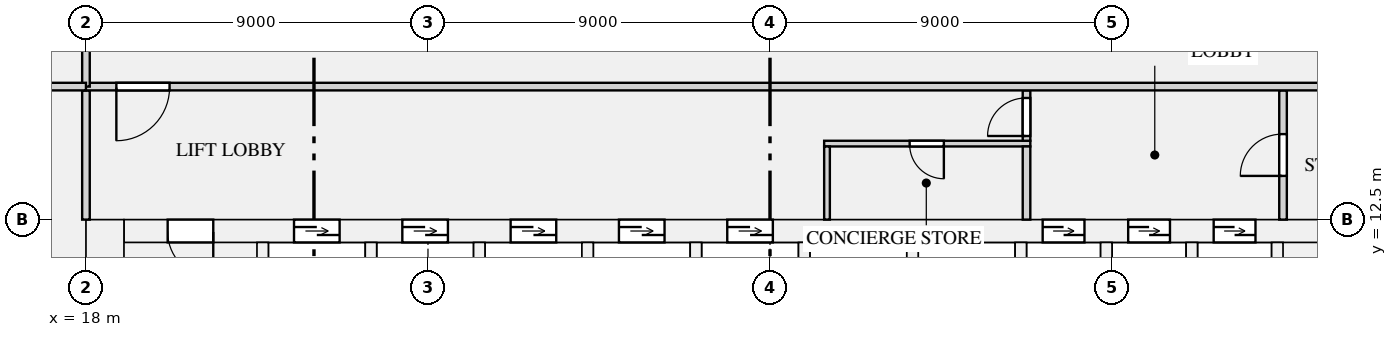
"""IFC4 building model, lengths in metres.
Left out: names, types, materials, properties, quantities, classifications, styles, units other than length and angle.
Written with IfcOpenShell. Run it as: python <this file> out.ifc"""

import sys

from ifc_helpers import new_model, si_unit, direction, frame, frame_2d, origin, place, context, subcontext, project, spatial, rectangle, extrude, element, fill, save


model = new_model("IFC4")
c1 = context("Model", 3, precision=1e-05, world=origin(), true_north=direction((0.0, 1.0)))
c2 = subcontext(c1, "Body", "Model", "MODEL_VIEW")
j1 = project(units=[si_unit("LENGTHUNIT", "METRE"), si_unit("PLANEANGLEUNIT", "RADIAN")], contexts=[c1])
p1 = place(None, origin())
s1 = spatial("IfcSite", under=j1, at=p1, CompositionType="ELEMENT")
p2 = place(p1, origin())
s2 = spatial("IfcBuilding", under=s1, at=p2, CompositionType="ELEMENT")
p3 = place(p2, frame((0.0, 0.0, 11.0)))
s3 = spatial("IfcBuildingStorey", under=s2, at=p3, CompositionType="ELEMENT", Elevation=11.0)
p4 = place(p3, frame((18.5, 0.0, 0.0), z_axis=(0.0, 0.0, 1.0), x_axis=(0.0, 1.0, 0.0)))
e1 = element("IfcWall", 1, at=p4, inside=s3, PredefinedType="SHEAR", context=c2, shape_type="SweptSolid", body=[
    extrude(rectangle(XDim=12.5, YDim=1.0, at=frame_2d((6.25, 0.0))), origin(), (0.0, 0.0, 1.0), 4.5),
])
p5 = place(p3, frame((19.0, 12.2, 0.0), z_axis=(0.0, 0.0, 1.0), x_axis=(1.0, 0.0, 0.0)))
e2 = element("IfcWall", 2, at=p5, inside=s3, PredefinedType="SHEAR", context=c2, shape_type="SweptSolid", body=[
    extrude(rectangle(XDim=34.0, YDim=0.6, at=frame_2d((17.0, 0.0))), origin(), (0.0, 0.0, 1.0), 4.5),
])
p6 = place(p5, frame((4.475, 0.0, 0.0)))
e3 = element("IfcOpeningElement", 3, at=p6, cuts=e2, PredefinedType="OPENING", context=c2, shape_type="SweptSolid", body=[
    extrude(rectangle(XDim=1.2, YDim=2.1, at=frame_2d((0.6, 1.05))), frame((0.0, 0.31, 0.0), z_axis=(0.0, -1.0, 0.0), x_axis=(1.0, 0.0, 0.0)), (0.0, 0.0, 1.0), 0.62),
])
p7 = place(p5, frame((7.325, 0.0, 0.0)))
e4 = element("IfcOpeningElement", 4, at=p7, cuts=e2, PredefinedType="OPENING", context=c2, shape_type="SweptSolid", body=[
    extrude(rectangle(XDim=1.2, YDim=2.1, at=frame_2d((0.6, 1.05))), frame((0.0, 0.31, 0.0), z_axis=(0.0, -1.0, 0.0), x_axis=(1.0, 0.0, 0.0)), (0.0, 0.0, 1.0), 0.62),
])
p8 = place(p5, frame((10.175, 0.0, 0.0)))
e5 = element("IfcOpeningElement", 5, at=p8, cuts=e2, PredefinedType="OPENING", context=c2, shape_type="SweptSolid", body=[
    extrude(rectangle(XDim=1.2, YDim=2.1, at=frame_2d((0.6, 1.05))), frame((0.0, 0.31, 0.0), z_axis=(0.0, -1.0, 0.0), x_axis=(1.0, 0.0, 0.0)), (0.0, 0.0, 1.0), 0.62),
])
p9 = place(p5, frame((13.025, 0.0, 0.0)))
e6 = element("IfcOpeningElement", 6, at=p9, cuts=e2, PredefinedType="OPENING", context=c2, shape_type="SweptSolid", body=[
    extrude(rectangle(XDim=1.2, YDim=2.1, at=frame_2d((0.6, 1.05))), frame((0.0, 0.31, 0.0), z_axis=(0.0, -1.0, 0.0), x_axis=(1.0, 0.0, 0.0)), (0.0, 0.0, 1.0), 0.62),
])
p10 = place(p5, frame((15.875, 0.0, 0.0)))
e7 = element("IfcOpeningElement", 7, at=p10, cuts=e2, PredefinedType="OPENING", context=c2, shape_type="SweptSolid", body=[
    extrude(rectangle(XDim=1.2, YDim=2.1, at=frame_2d((0.6, 1.05))), frame((0.0, 0.31, 0.0), z_axis=(0.0, -1.0, 0.0), x_axis=(1.0, 0.0, 0.0)), (0.0, 0.0, 1.0), 0.62),
])
p11 = place(p5, frame((24.175, 0.0, 0.0)))
e8 = element("IfcOpeningElement", 8, at=p11, cuts=e2, PredefinedType="OPENING", context=c2, shape_type="SweptSolid", body=[
    extrude(rectangle(XDim=1.1, YDim=2.1, at=frame_2d((0.55, 1.05))), frame((0.0, 0.31, 0.0), z_axis=(0.0, -1.0, 0.0), x_axis=(1.0, 0.0, 0.0)), (0.0, 0.0, 1.0), 0.62),
])
p12 = place(p5, frame((26.425, 0.0, 0.0)))
e9 = element("IfcOpeningElement", 9, at=p12, cuts=e2, PredefinedType="OPENING", context=c2, shape_type="SweptSolid", body=[
    extrude(rectangle(XDim=1.1, YDim=2.1, at=frame_2d((0.55, 1.05))), frame((0.0, 0.31, 0.0), z_axis=(0.0, -1.0, 0.0), x_axis=(1.0, 0.0, 0.0)), (0.0, 0.0, 1.0), 0.62),
])
p13 = place(p5, frame((28.675, 0.0, 0.0)))
e10 = element("IfcOpeningElement", 10, at=p13, cuts=e2, PredefinedType="OPENING", context=c2, shape_type="SweptSolid", body=[
    extrude(rectangle(XDim=1.1, YDim=2.1, at=frame_2d((0.55, 1.05))), frame((0.0, 0.31, 0.0), z_axis=(0.0, -1.0, 0.0), x_axis=(1.0, 0.0, 0.0)), (0.0, 0.0, 1.0), 0.62),
])
p14 = place(p5, frame((1.15, 0.0, 0.0)))
e11 = element("IfcOpeningElement", 11, at=p14, cuts=e2, PredefinedType="OPENING", context=c2, shape_type="SweptSolid", body=[
    extrude(rectangle(XDim=1.2, YDim=2.1, at=frame_2d((0.6, 1.05))), frame((0.0, 0.31, 0.0), z_axis=(0.0, -1.0, 0.0), x_axis=(1.0, 0.0, 0.0)), (0.0, 0.0, 1.0), 0.62),
])
p15 = place(p5, frame((31.65, 0.0, 0.0)))
e12 = element("IfcOpeningElement", 12, at=p15, cuts=e2, PredefinedType="OPENING", context=c2, shape_type="SweptSolid", body=[
    extrude(rectangle(XDim=1.2, YDim=2.1, at=frame_2d((0.6, 1.05))), frame((0.0, 0.31, 0.0), z_axis=(0.0, -1.0, 0.0), x_axis=(1.0, 0.0, 0.0)), (0.0, 0.0, 1.0), 0.62),
])
for number, where, z_axis, x_axis in (
    (13, (22.65, 9.35, 0.0), (0.0, 0.0, 1.0), (0.0, 1.0, 0.0)),
    (14, (25.5, 9.35, 0.0), (0.0, 0.0, 1.0), (0.0, 1.0, 0.0)),
    (15, (28.35, 9.35, 0.0), (0.0, 0.0, 1.0), (0.0, 1.0, 0.0)),
    (16, (31.2, 9.35, 0.0), (0.0, 0.0, 1.0), (0.0, 1.0, 0.0)),
    (17, (34.05, 9.35, 0.0), (0.0, 0.0, 1.0), (0.0, 1.0, 0.0)),
    (18, (36.9, 9.35, 0.0), (0.0, 0.0, 1.0), (0.0, 1.0, 0.0)),
    (19, (39.75, 9.35, 0.0), (0.0, 0.0, 1.0), (0.0, 1.0, 0.0)),
):
    element("IfcWall", number, at=place(p3, frame(where, z_axis=z_axis, x_axis=x_axis)), inside=s3, PredefinedType="SHEAR", context=c2, shape_type="SweptSolid", body=[
        extrude(rectangle(XDim=2.55, YDim=0.3, at=frame_2d((1.275, 0.0))), origin(), (0.0, 0.0, 1.0), 4.5),
    ])
for number, where, z_axis, x_axis in (
    (20, (42.6, 8.25, 0.0), (0.0, 0.0, 1.0), (0.0, 1.0, 0.0)),
    (21, (44.85, 8.25, 0.0), (0.0, 0.0, 1.0), (0.0, 1.0, 0.0)),
    (22, (47.1, 8.25, 0.0), (0.0, 0.0, 1.0), (0.0, 1.0, 0.0)),
    (23, (49.35, 8.25, 0.0), (0.0, 0.0, 1.0), (0.0, 1.0, 0.0)),
):
    element("IfcWall", number, at=place(p3, frame(where, z_axis=z_axis, x_axis=x_axis)), inside=s3, PredefinedType="SHEAR", context=c2, shape_type="SweptSolid", body=[
        extrude(rectangle(XDim=3.65, YDim=0.3, at=frame_2d((1.825, 0.0))), origin(), (0.0, 0.0, 1.0), 4.5),
    ])
p16 = place(p3, frame((37.425, 14.5, 0.0), z_axis=(0.0, 0.0, 1.0), x_axis=(1.0, 0.0, 0.0)))
e24 = element("IfcWall", 24, at=p16, inside=s3, PredefinedType="PARTITIONING", context=c2, shape_type="SweptSolid", body=[
    extrude(rectangle(XDim=5.425, YDim=0.15, at=frame_2d((2.712, 0.0))), origin(), (0.0, 0.0, 1.0), 3.9),
])
p17 = place(p16, frame((2.25, 0.0, 0.0)))
e25 = element("IfcOpeningElement", 25, at=p17, cuts=e24, PredefinedType="OPENING", context=c2, shape_type="SweptSolid", body=[
    extrude(rectangle(XDim=0.9, YDim=2.1, at=frame_2d((0.45, 1.05))), frame((0.0, 0.085, 0.0), z_axis=(0.0, -1.0, 0.0), x_axis=(1.0, 0.0, 0.0)), (0.0, 0.0, 1.0), 0.17),
])
p18 = place(p3, frame((18.0, 12.5, 0.0), z_axis=(0.0, 0.0, 1.0), x_axis=(0.0, 1.0, 0.0)))
e26 = element("IfcWall", 26, at=p18, inside=s3, PredefinedType="PARTITIONING", context=c2, shape_type="SweptSolid", body=[
    extrude(rectangle(XDim=3.4, YDim=0.2, at=frame_2d((1.7, 0.0))), origin(), (0.0, 0.0, 1.0), 3.9),
])
p19 = place(p3, frame((37.5, 12.5, 0.0), z_axis=(0.0, 0.0, 1.0), x_axis=(0.0, 1.0, 0.0)))
e27 = element("IfcWall", 27, at=p19, inside=s3, PredefinedType="PARTITIONING", context=c2, shape_type="SweptSolid", body=[
    extrude(rectangle(XDim=1.925, YDim=0.15, at=frame_2d((0.962, 0.0))), origin(), (0.0, 0.0, 1.0), 3.9),
])
p20 = place(p3, frame((42.75, 12.5, 0.0), z_axis=(0.0, 0.0, 1.0), x_axis=(0.0, 1.0, 0.0)))
e28 = element("IfcWall", 28, at=p20, inside=s3, PredefinedType="PARTITIONING", context=c2, shape_type="SweptSolid", body=[
    extrude(rectangle(XDim=1.925, YDim=0.2, at=frame_2d((0.962, 0.0))), origin(), (0.0, 0.0, 1.0), 3.9),
])
p21 = place(p3, frame((49.5, 12.5, 0.0), z_axis=(0.0, 0.0, 1.0), x_axis=(0.0, 1.0, 0.0)))
e29 = element("IfcWall", 29, at=p21, inside=s3, PredefinedType="PARTITIONING", context=c2, shape_type="SweptSolid", body=[
    extrude(rectangle(XDim=3.4, YDim=0.2, at=frame_2d((1.7, 0.0))), origin(), (0.0, 0.0, 1.0), 3.9),
])
p22 = place(p21, frame((1.15, 0.0, 0.0)))
e30 = element("IfcOpeningElement", 30, at=p22, cuts=e29, PredefinedType="OPENING", context=c2, shape_type="SweptSolid", body=[
    extrude(rectangle(XDim=1.1, YDim=2.1, at=frame_2d((0.55, 1.05))), frame((0.0, 0.11, 0.0), z_axis=(0.0, -1.0, 0.0), x_axis=(1.0, 0.0, 0.0)), (0.0, 0.0, 1.0), 0.22),
])
p23 = place(p3, frame((42.75, 14.575, 0.0), z_axis=(0.0, 0.0, 1.0), x_axis=(0.0, 1.0, 0.0)))
e31 = element("IfcWall", 31, at=p23, inside=s3, PredefinedType="PARTITIONING", context=c2, shape_type="SweptSolid", body=[
    extrude(rectangle(XDim=1.325, YDim=0.2, at=frame_2d((0.663, 0.0))), origin(), (0.0, 0.0, 1.0), 3.9),
])
p24 = place(p23, frame((0.125, 0.0, 0.0)))
e32 = element("IfcOpeningElement", 32, at=p24, cuts=e31, PredefinedType="OPENING", context=c2, shape_type="SweptSolid", body=[
    extrude(rectangle(XDim=1.0, YDim=2.1, at=frame_2d((0.5, 1.05))), frame((0.0, 0.11, 0.0), z_axis=(0.0, -1.0, 0.0), x_axis=(1.0, 0.0, 0.0)), (0.0, 0.0, 1.0), 0.22),
])
p25 = place(p3, frame((17.9, 16.0, 0.0), z_axis=(0.0, 0.0, 1.0), x_axis=(1.0, 0.0, 0.0)))
e33 = element("IfcWall", 33, at=p25, inside=s3, PredefinedType="PARTITIONING", context=c2, shape_type="SweptSolid", body=[
    extrude(rectangle(XDim=36.2, YDim=0.2, at=frame_2d((18.1, 0.0))), origin(), (0.0, 0.0, 1.0), 3.9),
])
p26 = place(p25, frame((0.9, 0.0, 0.0)))
e34 = element("IfcOpeningElement", 34, at=p26, cuts=e33, PredefinedType="OPENING", context=c2, shape_type="SweptSolid", body=[
    extrude(rectangle(XDim=1.4, YDim=2.1, at=frame_2d((0.7, 1.05))), frame((0.0, 0.11, 0.0), z_axis=(0.0, -1.0, 0.0), x_axis=(1.0, 0.0, 0.0)), (0.0, 0.0, 1.0), 0.22),
])
p27 = place(p25, frame((33.9, 0.0, 0.0)))
e35 = element("IfcOpeningElement", 35, at=p27, cuts=e33, PredefinedType="OPENING", context=c2, shape_type="SweptSolid", body=[
    extrude(rectangle(XDim=1.4, YDim=2.1, at=frame_2d((0.7, 1.05))), frame((0.0, 0.11, 0.0), z_axis=(0.0, -1.0, 0.0), x_axis=(1.0, 0.0, 0.0)), (0.0, 0.0, 1.0), 0.22),
])
p28 = place(p3, frame((18.0, 16.0, 0.0), z_axis=(0.0, 0.0, 1.0), x_axis=(0.0, 1.0, 0.0)))
e36 = element("IfcWall", 36, at=p28, inside=s3, PredefinedType="PARTITIONING", context=c2, shape_type="SweptSolid", body=[
    extrude(rectangle(XDim=7.0, YDim=0.2, at=frame_2d((3.5, 0.0))), origin(), (0.0, 0.0, 1.0), 3.9),
])
p29 = place(p3, frame((3.124, 16.0, 0.0), z_axis=(0.0, 0.0, 1.0), x_axis=(1.0, 0.0, 0.0)))
e37 = element("IfcWall", 37, at=p29, inside=s3, PredefinedType="PARTITIONING", context=c2, shape_type="SweptSolid", body=[
    extrude(rectangle(XDim=14.876, YDim=0.2, at=frame_2d((7.438, 0.0))), origin(), (0.0, 0.0, 1.0), 3.9),
])
p30 = place(p29, frame((6.538, 0.0, 0.0)))
e38 = element("IfcOpeningElement", 38, at=p30, cuts=e37, PredefinedType="OPENING", context=c2, shape_type="SweptSolid", body=[
    extrude(rectangle(XDim=1.8, YDim=2.4, at=frame_2d((0.9, 1.2))), frame((0.0, 0.11, 0.0), z_axis=(0.0, -1.0, 0.0), x_axis=(1.0, 0.0, 0.0)), (0.0, 0.0, 1.0), 0.22),
])
p31 = place(p6, origin())
e39 = element("IfcDoor", 39, at=p31, inside=s3, OperationType="DOUBLE_DOOR_SLIDING", PredefinedType="DOOR", context=c2, shape_type="SweptSolid", body=[
    extrude(rectangle(XDim=1.2, YDim=2.1, at=frame_2d((0.6, 1.05))), frame((0.0, 0.025, 0.0), z_axis=(0.0, -1.0, 0.0), x_axis=(1.0, 0.0, 0.0)), (0.0, 0.0, 1.0), 0.05),
])
fill(e3, e39)
p32 = place(p7, origin())
e40 = element("IfcDoor", 40, at=p32, inside=s3, OperationType="DOUBLE_DOOR_SLIDING", PredefinedType="DOOR", context=c2, shape_type="SweptSolid", body=[
    extrude(rectangle(XDim=1.2, YDim=2.1, at=frame_2d((0.6, 1.05))), frame((0.0, 0.025, 0.0), z_axis=(0.0, -1.0, 0.0), x_axis=(1.0, 0.0, 0.0)), (0.0, 0.0, 1.0), 0.05),
])
fill(e4, e40)
p33 = place(p8, origin())
e41 = element("IfcDoor", 41, at=p33, inside=s3, OperationType="DOUBLE_DOOR_SLIDING", PredefinedType="DOOR", context=c2, shape_type="SweptSolid", body=[
    extrude(rectangle(XDim=1.2, YDim=2.1, at=frame_2d((0.6, 1.05))), frame((0.0, 0.025, 0.0), z_axis=(0.0, -1.0, 0.0), x_axis=(1.0, 0.0, 0.0)), (0.0, 0.0, 1.0), 0.05),
])
fill(e5, e41)
p34 = place(p9, origin())
e42 = element("IfcDoor", 42, at=p34, inside=s3, OperationType="DOUBLE_DOOR_SLIDING", PredefinedType="DOOR", context=c2, shape_type="SweptSolid", body=[
    extrude(rectangle(XDim=1.2, YDim=2.1, at=frame_2d((0.6, 1.05))), frame((0.0, 0.025, 0.0), z_axis=(0.0, -1.0, 0.0), x_axis=(1.0, 0.0, 0.0)), (0.0, 0.0, 1.0), 0.05),
])
fill(e6, e42)
p35 = place(p10, origin())
e43 = element("IfcDoor", 43, at=p35, inside=s3, OperationType="DOUBLE_DOOR_SLIDING", PredefinedType="DOOR", context=c2, shape_type="SweptSolid", body=[
    extrude(rectangle(XDim=1.2, YDim=2.1, at=frame_2d((0.6, 1.05))), frame((0.0, 0.025, 0.0), z_axis=(0.0, -1.0, 0.0), x_axis=(1.0, 0.0, 0.0)), (0.0, 0.0, 1.0), 0.05),
])
fill(e7, e43)
p36 = place(p11, origin())
e44 = element("IfcDoor", 44, at=p36, inside=s3, OperationType="DOUBLE_DOOR_SLIDING", PredefinedType="DOOR", context=c2, shape_type="SweptSolid", body=[
    extrude(rectangle(XDim=1.1, YDim=2.1, at=frame_2d((0.55, 1.05))), frame((0.0, 0.025, 0.0), z_axis=(0.0, -1.0, 0.0), x_axis=(1.0, 0.0, 0.0)), (0.0, 0.0, 1.0), 0.05),
])
fill(e8, e44)
p37 = place(p12, origin())
e45 = element("IfcDoor", 45, at=p37, inside=s3, OperationType="DOUBLE_DOOR_SLIDING", PredefinedType="DOOR", context=c2, shape_type="SweptSolid", body=[
    extrude(rectangle(XDim=1.1, YDim=2.1, at=frame_2d((0.55, 1.05))), frame((0.0, 0.025, 0.0), z_axis=(0.0, -1.0, 0.0), x_axis=(1.0, 0.0, 0.0)), (0.0, 0.0, 1.0), 0.05),
])
fill(e9, e45)
p38 = place(p13, origin())
e46 = element("IfcDoor", 46, at=p38, inside=s3, OperationType="DOUBLE_DOOR_SLIDING", PredefinedType="DOOR", context=c2, shape_type="SweptSolid", body=[
    extrude(rectangle(XDim=1.1, YDim=2.1, at=frame_2d((0.55, 1.05))), frame((0.0, 0.025, 0.0), z_axis=(0.0, -1.0, 0.0), x_axis=(1.0, 0.0, 0.0)), (0.0, 0.0, 1.0), 0.05),
])
fill(e10, e46)
p39 = place(p17, frame((0.9, 0.0, 0.0), z_axis=(0.0, 0.0, 1.0), x_axis=(-1.0, 0.0, 0.0)))
e47 = element("IfcDoor", 47, at=p39, inside=s3, OperationType="SINGLE_SWING_LEFT", PredefinedType="DOOR", context=c2, shape_type="SweptSolid", body=[
    extrude(rectangle(XDim=0.9, YDim=2.1, at=frame_2d((0.45, 1.05))), frame((0.0, 0.025, 0.0), z_axis=(0.0, -1.0, 0.0), x_axis=(1.0, 0.0, 0.0)), (0.0, 0.0, 1.0), 0.05),
])
fill(e25, e47)
p40 = place(p14, frame((1.2, 0.0, 0.0), z_axis=(0.0, 0.0, 1.0), x_axis=(-1.0, 0.0, 0.0)))
e48 = element("IfcDoor", 48, at=p40, inside=s3, OperationType="SINGLE_SWING_LEFT", PredefinedType="DOOR", context=c2, shape_type="SweptSolid", body=[
    extrude(rectangle(XDim=1.2, YDim=2.1, at=frame_2d((0.6, 1.05))), frame((0.0, 0.025, 0.0), z_axis=(0.0, -1.0, 0.0), x_axis=(1.0, 0.0, 0.0)), (0.0, 0.0, 1.0), 0.05),
])
fill(e11, e48)
p41 = place(p24, origin())
e49 = element("IfcDoor", 49, at=p41, inside=s3, OperationType="SINGLE_SWING_LEFT", PredefinedType="DOOR", context=c2, shape_type="SweptSolid", body=[
    extrude(rectangle(XDim=1.0, YDim=2.1, at=frame_2d((0.5, 1.05))), frame((0.0, 0.025, 0.0), z_axis=(0.0, -1.0, 0.0), x_axis=(1.0, 0.0, 0.0)), (0.0, 0.0, 1.0), 0.05),
])
fill(e32, e49)
p42 = place(p22, origin())
e50 = element("IfcDoor", 50, at=p42, inside=s3, OperationType="SINGLE_SWING_LEFT", PredefinedType="DOOR", context=c2, shape_type="SweptSolid", body=[
    extrude(rectangle(XDim=1.1, YDim=2.1, at=frame_2d((0.55, 1.05))), frame((0.0, 0.025, 0.0), z_axis=(0.0, -1.0, 0.0), x_axis=(1.0, 0.0, 0.0)), (0.0, 0.0, 1.0), 0.05),
])
fill(e30, e50)
p43 = place(p26, frame((1.4, 0.0, 0.0), z_axis=(0.0, 0.0, 1.0), x_axis=(-1.0, 0.0, 0.0)))
e51 = element("IfcDoor", 51, at=p43, inside=s3, OperationType="SINGLE_SWING_RIGHT", PredefinedType="DOOR", context=c2, shape_type="SweptSolid", body=[
    extrude(rectangle(XDim=1.4, YDim=2.1, at=frame_2d((0.7, 1.05))), frame((0.0, 0.025, 0.0), z_axis=(0.0, -1.0, 0.0), x_axis=(1.0, 0.0, 0.0)), (0.0, 0.0, 1.0), 0.05),
])
fill(e34, e51)
save(model, sys.argv[1])
